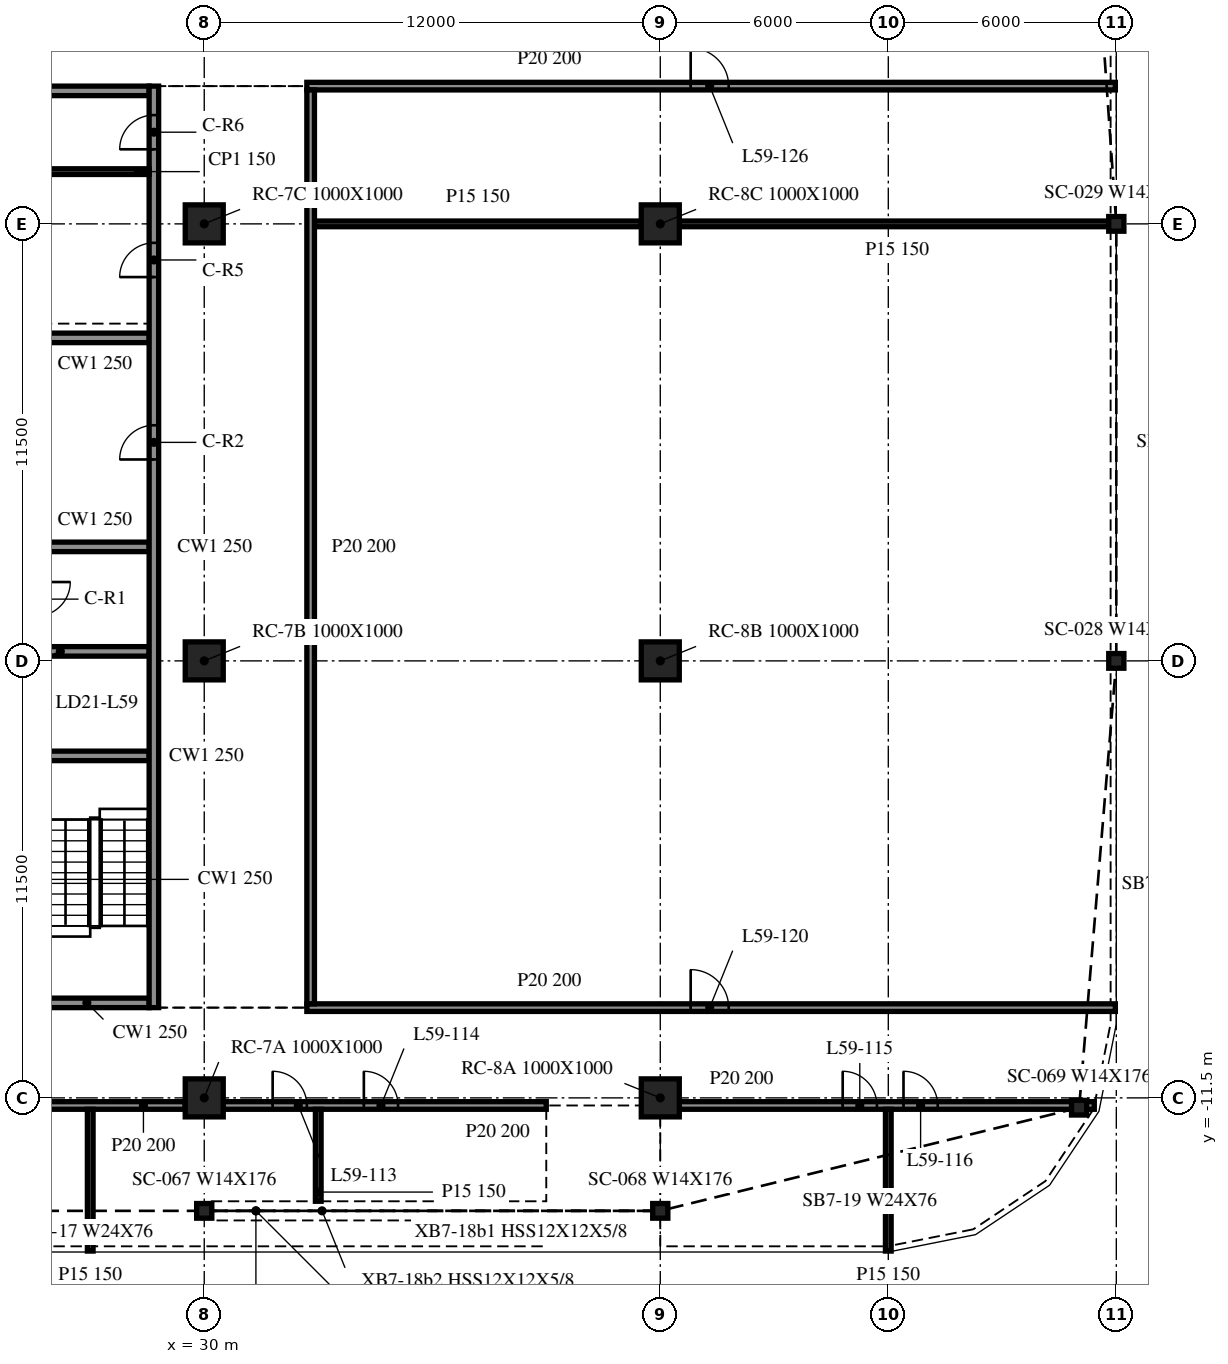
"""IFC4 building model, lengths in metres.
Left out: names, types, materials, properties, quantities, classifications, styles, units other than length and angle.
Written with IfcOpenShell. Run it as: python <this file> out.ifc"""

import sys

from ifc_helpers import new_model, si_unit, direction, frame, frame_2d, origin, origin_2d, place, context, subcontext, project, spatial, rectangle, i_section, extrude, element, fill, save


model = new_model("IFC4")
c1 = context("Model", 3, precision=1e-05, world=origin(), true_north=direction((0.0, 1.0)))
c2 = subcontext(c1, "Body", "Model", "MODEL_VIEW")
j1 = project(units=[si_unit("LENGTHUNIT", "METRE"), si_unit("PLANEANGLEUNIT", "RADIAN")], contexts=[c1])
p1 = place(None, origin())
s1 = spatial("IfcSite", under=j1, at=p1, CompositionType="ELEMENT")
p2 = place(p1, origin())
s2 = spatial("IfcBuilding", under=s1, at=p2, CompositionType="ELEMENT")
p3 = place(p2, frame((0.0, 0.0, 243.8)))
s3 = spatial("IfcBuildingStorey", under=s2, at=p3, CompositionType="ELEMENT", Elevation=243.8)
for number, where, z_axis, x_axis in (
    (1, (30.0, -11.5, -0.34), (0.0, 0.0, 1.0), (1.0, 0.0, 0.0)),
    (2, (30.0, 0.0, -0.34), (0.0, 0.0, 1.0), (1.0, 0.0, 0.0)),
    (3, (30.0, 11.5, -0.34), (0.0, 0.0, 1.0), (1.0, 0.0, 0.0)),
    (4, (42.0, -11.5, -0.34), (0.0, 0.0, 1.0), (1.0, 0.0, 0.0)),
    (5, (42.0, 0.0, -0.34), (0.0, 0.0, 1.0), (1.0, 0.0, 0.0)),
    (6, (42.0, 11.5, -0.34), (0.0, 0.0, 1.0), (1.0, 0.0, 0.0)),
):
    element("IfcColumn", number, at=place(p3, frame(where, z_axis=z_axis, x_axis=x_axis)), inside=s3, PredefinedType="COLUMN", context=c2, shape_type="SweptSolid", body=[
        extrude(rectangle(XDim=1.0, YDim=1.0, at=origin_2d()), origin(), (0.0, 0.0, 1.0), 3.8),
    ])
for number, where, z_axis, x_axis in (
    (7, (30.0, -14.473, -0.34), (0.0, 0.0, 1.0), (1.0, 0.0, 0.0)),
    (8, (42.0, -14.473, -0.34), (0.0, 0.0, 1.0), (1.0, 0.0, 0.0)),
    (9, (53.021, -11.758, -0.34), (0.0, 0.0, 1.0), (1.0, 0.0, 0.0)),
    (10, (54.0, 0.0, -0.34), (0.0, 0.0, 1.0), (1.0, 0.0, 0.0)),
    (11, (54.0, 11.5, -0.34), (0.0, 0.0, 1.0), (1.0, 0.0, 0.0)),
):
    element("IfcColumn", number, at=place(p3, frame(where, z_axis=z_axis, x_axis=x_axis)), inside=s3, PredefinedType="COLUMN", context=c2, shape_type="SweptSolid", body=[
        extrude(i_section(OverallWidth=0.399, OverallDepth=0.386, WebThickness=0.021, FlangeThickness=0.033, at=origin_2d()), origin(), (0.0, 0.0, 1.0), 3.8),
    ])
p4 = place(p3, frame((28.675, -9.125, 0.0), z_axis=(0.0, 0.0, 1.0), x_axis=(0.0, 1.0, 0.0)))
e12 = element("IfcWall", 12, at=p4, inside=s3, PredefinedType="SOLIDWALL", context=c2, shape_type="SweptSolid", body=[
    extrude(rectangle(XDim=24.25, YDim=0.25, at=frame_2d((12.125, 0.0))), origin(), (0.0, 0.0, 1.0), 3.46),
])
p5 = place(p4, frame((14.425, 0.0, 0.0)))
e13 = element("IfcOpeningElement", 13, at=p5, cuts=e12, PredefinedType="OPENING", context=c2, shape_type="SweptSolid", body=[
    extrude(rectangle(XDim=0.9, YDim=2.1, at=frame_2d((0.45, 1.05))), frame((0.0, 0.135, 0.0), z_axis=(0.0, -1.0, 0.0), x_axis=(1.0, 0.0, 0.0)), (0.0, 0.0, 1.0), 0.27),
])
p6 = place(p4, frame((19.225, 0.0, 0.0)))
e14 = element("IfcOpeningElement", 14, at=p6, cuts=e12, PredefinedType="OPENING", context=c2, shape_type="SweptSolid", body=[
    extrude(rectangle(XDim=0.9, YDim=2.1, at=frame_2d((0.45, 1.05))), frame((0.0, 0.135, 0.0), z_axis=(0.0, -1.0, 0.0), x_axis=(1.0, 0.0, 0.0)), (0.0, 0.0, 1.0), 0.27),
])
p7 = place(p4, frame((22.587, 0.0, 0.0)))
e15 = element("IfcOpeningElement", 15, at=p7, cuts=e12, PredefinedType="OPENING", context=c2, shape_type="SweptSolid", body=[
    extrude(rectangle(XDim=0.9, YDim=2.1, at=frame_2d((0.45, 1.05))), frame((0.0, 0.135, 0.0), z_axis=(0.0, -1.0, 0.0), x_axis=(1.0, 0.0, 0.0)), (0.0, 0.0, 1.0), 0.27),
])
p8 = place(p3, frame((28.55, -9.0, 0.0), z_axis=(0.0, 0.0, 1.0), x_axis=(-1.0, 0.0, 0.0)))
e16 = element("IfcWall", 16, at=p8, inside=s3, PredefinedType="SOLIDWALL", context=c2, shape_type="SweptSolid", body=[
    extrude(rectangle(XDim=9.1, YDim=0.25, at=frame_2d((4.55, 0.0))), origin(), (0.0, 0.0, 1.0), 3.46),
])
p9 = place(p8, frame((3.65, 0.0, 0.0)))
e17 = element("IfcOpeningElement", 17, at=p9, cuts=e16, PredefinedType="OPENING", context=c2, shape_type="SweptSolid", body=[
    extrude(rectangle(XDim=1.8, YDim=2.1, at=frame_2d((0.9, 1.05))), frame((0.0, 0.135, 0.0), z_axis=(0.0, -1.0, 0.0), x_axis=(1.0, 0.0, 0.0)), (0.0, 0.0, 1.0), 0.27),
])
p10 = place(p3, frame((19.45, 15.0, 0.0), z_axis=(0.0, 0.0, 1.0), x_axis=(1.0, 0.0, 0.0)))
e18 = element("IfcWall", 18, at=p10, inside=s3, PredefinedType="SOLIDWALL", context=c2, shape_type="SweptSolid", body=[
    extrude(rectangle(XDim=9.1, YDim=0.25, at=frame_2d((4.55, 0.0))), origin(), (0.0, 0.0, 1.0), 3.46),
])
p11 = place(p10, frame((3.65, 0.0, 0.0)))
e19 = element("IfcOpeningElement", 19, at=p11, cuts=e18, PredefinedType="OPENING", context=c2, shape_type="SweptSolid", body=[
    extrude(rectangle(XDim=1.8, YDim=2.1, at=frame_2d((0.9, 1.05))), frame((0.0, 0.135, 0.0), z_axis=(0.0, -1.0, 0.0), x_axis=(1.0, 0.0, 0.0)), (0.0, 0.0, 1.0), 0.27),
])
for number, where, z_axis, x_axis in (
    (20, (25.7, -2.5, 0.0), (0.0, 0.0, 1.0), (1.0, 0.0, 0.0)),
    (21, (25.7, 0.25, 0.0), (0.0, 0.0, 1.0), (1.0, 0.0, 0.0)),
    (22, (25.7, 3.0, 0.0), (0.0, 0.0, 1.0), (1.0, 0.0, 0.0)),
    (23, (25.7, 8.5, 0.0), (0.0, 0.0, 1.0), (1.0, 0.0, 0.0)),
):
    element("IfcWall", number, at=place(p3, frame(where, z_axis=z_axis, x_axis=x_axis)), inside=s3, PredefinedType="SOLIDWALL", context=c2, shape_type="SweptSolid", body=[
        extrude(rectangle(XDim=2.85, YDim=0.25, at=frame_2d((1.425, 0.0))), origin(), (0.0, 0.0, 1.0), 3.46),
    ])
p12 = place(p3, frame((25.7, 12.875, 0.0), z_axis=(0.0, 0.0, 1.0), x_axis=(1.0, 0.0, 0.0)))
e24 = element("IfcWall", 24, at=p12, inside=s3, PredefinedType="PARTITIONING", context=c2, shape_type="SweptSolid", body=[
    extrude(rectangle(XDim=2.85, YDim=0.15, at=frame_2d((1.425, 0.0))), origin(), (0.0, 0.0, 1.0), 3.46),
])
p13 = place(p3, frame((18.5, -11.7, 0.0), z_axis=(0.0, 0.0, 1.0), x_axis=(1.0, 0.0, 0.0)))
e25 = element("IfcWall", 25, at=p13, inside=s3, PredefinedType="PARTITIONING", context=c2, shape_type="SweptSolid", body=[
    extrude(rectangle(XDim=11.0, YDim=0.2, at=frame_2d((5.5, 0.0))), origin(), (0.0, 0.0, 1.0), 3.46),
])
p14 = place(p13, frame((1.7, 0.0, 0.0)))
e26 = element("IfcOpeningElement", 26, at=p14, cuts=e25, PredefinedType="OPENING", context=c2, shape_type="SweptSolid", body=[
    extrude(rectangle(XDim=0.9, YDim=2.1, at=frame_2d((0.45, 1.05))), frame((0.0, 0.11, 0.0), z_axis=(0.0, -1.0, 0.0), x_axis=(1.0, 0.0, 0.0)), (0.0, 0.0, 1.0), 0.22),
])
p15 = place(p13, frame((5.1, 0.0, 0.0)))
e27 = element("IfcOpeningElement", 27, at=p15, cuts=e25, PredefinedType="OPENING", context=c2, shape_type="SweptSolid", body=[
    extrude(rectangle(XDim=0.9, YDim=2.1, at=frame_2d((0.45, 1.05))), frame((0.0, 0.11, 0.0), z_axis=(0.0, -1.0, 0.0), x_axis=(1.0, 0.0, 0.0)), (0.0, 0.0, 1.0), 0.22),
])
p16 = place(p3, frame((30.5, -11.7, 0.0), z_axis=(0.0, 0.0, 1.0), x_axis=(1.0, 0.0, 0.0)))
e28 = element("IfcWall", 28, at=p16, inside=s3, PredefinedType="PARTITIONING", context=c2, shape_type="SweptSolid", body=[
    extrude(rectangle(XDim=8.5, YDim=0.2, at=frame_2d((4.25, 0.0))), origin(), (0.0, 0.0, 1.0), 3.46),
])
p17 = place(p16, frame((1.3, 0.0, 0.0)))
e29 = element("IfcOpeningElement", 29, at=p17, cuts=e28, PredefinedType="OPENING", context=c2, shape_type="SweptSolid", body=[
    extrude(rectangle(XDim=0.9, YDim=2.1, at=frame_2d((0.45, 1.05))), frame((0.0, 0.11, 0.0), z_axis=(0.0, -1.0, 0.0), x_axis=(1.0, 0.0, 0.0)), (0.0, 0.0, 1.0), 0.22),
])
p18 = place(p16, frame((3.7, 0.0, 0.0)))
e30 = element("IfcOpeningElement", 30, at=p18, cuts=e28, PredefinedType="OPENING", context=c2, shape_type="SweptSolid", body=[
    extrude(rectangle(XDim=0.9, YDim=2.1, at=frame_2d((0.45, 1.05))), frame((0.0, 0.11, 0.0), z_axis=(0.0, -1.0, 0.0), x_axis=(1.0, 0.0, 0.0)), (0.0, 0.0, 1.0), 0.22),
])
p19 = place(p3, frame((42.5, -11.7, 0.0), z_axis=(0.0, 0.0, 1.0), x_axis=(1.0, 0.0, 0.0)))
e31 = element("IfcWall", 31, at=p19, inside=s3, PredefinedType="PARTITIONING", context=c2, shape_type="SweptSolid", body=[
    extrude(rectangle(XDim=10.921, YDim=0.2, at=frame_2d((5.46, 0.0))), origin(), (0.0, 0.0, 1.0), 3.46),
])
p20 = place(p19, frame((4.3, 0.0, 0.0)))
e32 = element("IfcOpeningElement", 32, at=p20, cuts=e31, PredefinedType="OPENING", context=c2, shape_type="SweptSolid", body=[
    extrude(rectangle(XDim=0.9, YDim=2.1, at=frame_2d((0.45, 1.05))), frame((0.0, 0.11, 0.0), z_axis=(0.0, -1.0, 0.0), x_axis=(1.0, 0.0, 0.0)), (0.0, 0.0, 1.0), 0.22),
])
p21 = place(p19, frame((5.9, 0.0, 0.0)))
e33 = element("IfcOpeningElement", 33, at=p21, cuts=e31, PredefinedType="OPENING", context=c2, shape_type="SweptSolid", body=[
    extrude(rectangle(XDim=0.9, YDim=2.1, at=frame_2d((0.45, 1.05))), frame((0.0, 0.11, 0.0), z_axis=(0.0, -1.0, 0.0), x_axis=(1.0, 0.0, 0.0)), (0.0, 0.0, 1.0), 0.22),
])
p22 = place(p3, frame((32.7, -9.125, 0.0), z_axis=(0.0, 0.0, 1.0), x_axis=(1.0, 0.0, 0.0)))
e34 = element("IfcWall", 34, at=p22, inside=s3, PredefinedType="PARTITIONING", context=c2, shape_type="SweptSolid", body=[
    extrude(rectangle(XDim=21.275, YDim=0.2, at=frame_2d((10.638, 0.0))), origin(), (0.0, 0.0, 1.0), 3.46),
])
p23 = place(p22, frame((10.1, 0.0, 0.0)))
e35 = element("IfcOpeningElement", 35, at=p23, cuts=e34, PredefinedType="OPENING", context=c2, shape_type="SweptSolid", body=[
    extrude(rectangle(XDim=1.0, YDim=2.1, at=frame_2d((0.5, 1.05))), frame((0.0, 0.11, 0.0), z_axis=(0.0, -1.0, 0.0), x_axis=(1.0, 0.0, 0.0)), (0.0, 0.0, 1.0), 0.22),
])
p24 = place(p3, frame((32.9, 11.5, 0.0), z_axis=(0.0, 0.0, 1.0), x_axis=(1.0, 0.0, 0.0)))
e36 = element("IfcWall", 36, at=p24, inside=s3, PredefinedType="PARTITIONING", context=c2, shape_type="SweptSolid", body=[
    extrude(rectangle(XDim=8.6, YDim=0.15, at=frame_2d((4.3, 0.0))), origin(), (0.0, 0.0, 1.0), 3.46),
])
p25 = place(p3, frame((42.5, 11.5, 0.0), z_axis=(0.0, 0.0, 1.0), x_axis=(1.0, 0.0, 0.0)))
e37 = element("IfcWall", 37, at=p25, inside=s3, PredefinedType="PARTITIONING", context=c2, shape_type="SweptSolid", body=[
    extrude(rectangle(XDim=11.475, YDim=0.15, at=frame_2d((5.738, 0.0))), origin(), (0.0, 0.0, 1.0), 3.46),
])
p26 = place(p3, frame((32.7, 15.125, 0.0), z_axis=(0.0, 0.0, 1.0), x_axis=(1.0, 0.0, 0.0)))
e38 = element("IfcWall", 38, at=p26, inside=s3, PredefinedType="PARTITIONING", context=c2, shape_type="SweptSolid", body=[
    extrude(rectangle(XDim=21.275, YDim=0.2, at=frame_2d((10.638, 0.0))), origin(), (0.0, 0.0, 1.0), 3.46),
])
p27 = place(p26, frame((10.1, 0.0, 0.0)))
e39 = element("IfcOpeningElement", 39, at=p27, cuts=e38, PredefinedType="OPENING", context=c2, shape_type="SweptSolid", body=[
    extrude(rectangle(XDim=1.0, YDim=2.1, at=frame_2d((0.5, 1.05))), frame((0.0, 0.11, 0.0), z_axis=(0.0, -1.0, 0.0), x_axis=(1.0, 0.0, 0.0)), (0.0, 0.0, 1.0), 0.22),
])
p28 = place(p3, frame((27.0, -15.531, 0.0), z_axis=(0.0, 0.0, 1.0), x_axis=(0.0, 1.0, 0.0)))
e40 = element("IfcWall", 40, at=p28, inside=s3, PredefinedType="PARTITIONING", context=c2, shape_type="SweptSolid", body=[
    extrude(rectangle(XDim=3.731, YDim=0.15, at=frame_2d((1.865, 0.0))), origin(), (0.0, 0.0, 1.0), 3.46),
])
p29 = place(p3, frame((32.8, -9.025, 0.0), z_axis=(0.0, 0.0, 1.0), x_axis=(0.0, 1.0, 0.0)))
e41 = element("IfcWall", 41, at=p29, inside=s3, PredefinedType="PARTITIONING", context=c2, shape_type="SweptSolid", body=[
    extrude(rectangle(XDim=24.05, YDim=0.2, at=frame_2d((12.025, 0.0))), origin(), (0.0, 0.0, 1.0), 3.46),
])
p30 = place(p3, frame((33.0, -14.221, 0.0), z_axis=(0.0, 0.0, 1.0), x_axis=(0.0, 1.0, 0.0)))
e42 = element("IfcWall", 42, at=p30, inside=s3, PredefinedType="PARTITIONING", context=c2, shape_type="SweptSolid", body=[
    extrude(rectangle(XDim=2.421, YDim=0.15, at=frame_2d((1.21, 0.0))), origin(), (0.0, 0.0, 1.0), 3.46),
])
p31 = place(p3, frame((48.0, -15.531, 0.0), z_axis=(0.0, 0.0, 1.0), x_axis=(0.0, 1.0, 0.0)))
e43 = element("IfcWall", 43, at=p31, inside=s3, PredefinedType="PARTITIONING", context=c2, shape_type="SweptSolid", body=[
    extrude(rectangle(XDim=3.731, YDim=0.15, at=frame_2d((1.865, 0.0))), origin(), (0.0, 0.0, 1.0), 3.46),
])
p32 = place(p5, origin())
e44 = element("IfcDoor", 44, at=p32, inside=s3, OperationType="SINGLE_SWING_RIGHT", PredefinedType="DOOR", context=c2, shape_type="SweptSolid", body=[
    extrude(rectangle(XDim=0.9, YDim=2.1, at=frame_2d((0.45, 1.05))), frame((0.0, 0.025, 0.0), z_axis=(0.0, -1.0, 0.0), x_axis=(1.0, 0.0, 0.0)), (0.0, 0.0, 1.0), 0.05),
])
fill(e13, e44)
p33 = place(p6, origin())
e45 = element("IfcDoor", 45, at=p33, inside=s3, OperationType="SINGLE_SWING_LEFT", PredefinedType="DOOR", context=c2, shape_type="SweptSolid", body=[
    extrude(rectangle(XDim=0.9, YDim=2.1, at=frame_2d((0.45, 1.05))), frame((0.0, 0.025, 0.0), z_axis=(0.0, -1.0, 0.0), x_axis=(1.0, 0.0, 0.0)), (0.0, 0.0, 1.0), 0.05),
])
fill(e14, e45)
p34 = place(p7, origin())
e46 = element("IfcDoor", 46, at=p34, inside=s3, OperationType="SINGLE_SWING_RIGHT", PredefinedType="DOOR", context=c2, shape_type="SweptSolid", body=[
    extrude(rectangle(XDim=0.9, YDim=2.1, at=frame_2d((0.45, 1.05))), frame((0.0, 0.025, 0.0), z_axis=(0.0, -1.0, 0.0), x_axis=(1.0, 0.0, 0.0)), (0.0, 0.0, 1.0), 0.05),
])
fill(e15, e46)
p35 = place(p17, origin())
e47 = element("IfcDoor", 47, at=p35, inside=s3, OperationType="SINGLE_SWING_RIGHT", PredefinedType="DOOR", context=c2, shape_type="SweptSolid", body=[
    extrude(rectangle(XDim=0.9, YDim=2.1, at=frame_2d((0.45, 1.05))), frame((0.0, 0.025, 0.0), z_axis=(0.0, -1.0, 0.0), x_axis=(1.0, 0.0, 0.0)), (0.0, 0.0, 1.0), 0.05),
])
fill(e29, e47)
p36 = place(p18, origin())
e48 = element("IfcDoor", 48, at=p36, inside=s3, OperationType="SINGLE_SWING_RIGHT", PredefinedType="DOOR", context=c2, shape_type="SweptSolid", body=[
    extrude(rectangle(XDim=0.9, YDim=2.1, at=frame_2d((0.45, 1.05))), frame((0.0, 0.025, 0.0), z_axis=(0.0, -1.0, 0.0), x_axis=(1.0, 0.0, 0.0)), (0.0, 0.0, 1.0), 0.05),
])
fill(e30, e48)
p37 = place(p20, origin())
e49 = element("IfcDoor", 49, at=p37, inside=s3, OperationType="SINGLE_SWING_RIGHT", PredefinedType="DOOR", context=c2, shape_type="SweptSolid", body=[
    extrude(rectangle(XDim=0.9, YDim=2.1, at=frame_2d((0.45, 1.05))), frame((0.0, 0.025, 0.0), z_axis=(0.0, -1.0, 0.0), x_axis=(1.0, 0.0, 0.0)), (0.0, 0.0, 1.0), 0.05),
])
fill(e32, e49)
p38 = place(p21, origin())
e50 = element("IfcDoor", 50, at=p38, inside=s3, OperationType="SINGLE_SWING_LEFT", PredefinedType="DOOR", context=c2, shape_type="SweptSolid", body=[
    extrude(rectangle(XDim=0.9, YDim=2.1, at=frame_2d((0.45, 1.05))), frame((0.0, 0.025, 0.0), z_axis=(0.0, -1.0, 0.0), x_axis=(1.0, 0.0, 0.0)), (0.0, 0.0, 1.0), 0.05),
])
fill(e33, e50)
p39 = place(p23, origin())
e51 = element("IfcDoor", 51, at=p39, inside=s3, OperationType="SINGLE_SWING_RIGHT", PredefinedType="DOOR", context=c2, shape_type="SweptSolid", body=[
    extrude(rectangle(XDim=1.0, YDim=2.1, at=frame_2d((0.5, 1.05))), frame((0.0, 0.025, 0.0), z_axis=(0.0, -1.0, 0.0), x_axis=(1.0, 0.0, 0.0)), (0.0, 0.0, 1.0), 0.05),
])
fill(e35, e51)
p40 = place(p27, origin())
e52 = element("IfcDoor", 52, at=p40, inside=s3, OperationType="SINGLE_SWING_LEFT", PredefinedType="DOOR", context=c2, shape_type="SweptSolid", body=[
    extrude(rectangle(XDim=1.0, YDim=2.1, at=frame_2d((0.5, 1.05))), frame((0.0, 0.025, 0.0), z_axis=(0.0, -1.0, 0.0), x_axis=(1.0, 0.0, 0.0)), (0.0, 0.0, 1.0), 0.05),
])
fill(e39, e52)
save(model, sys.argv[1])
